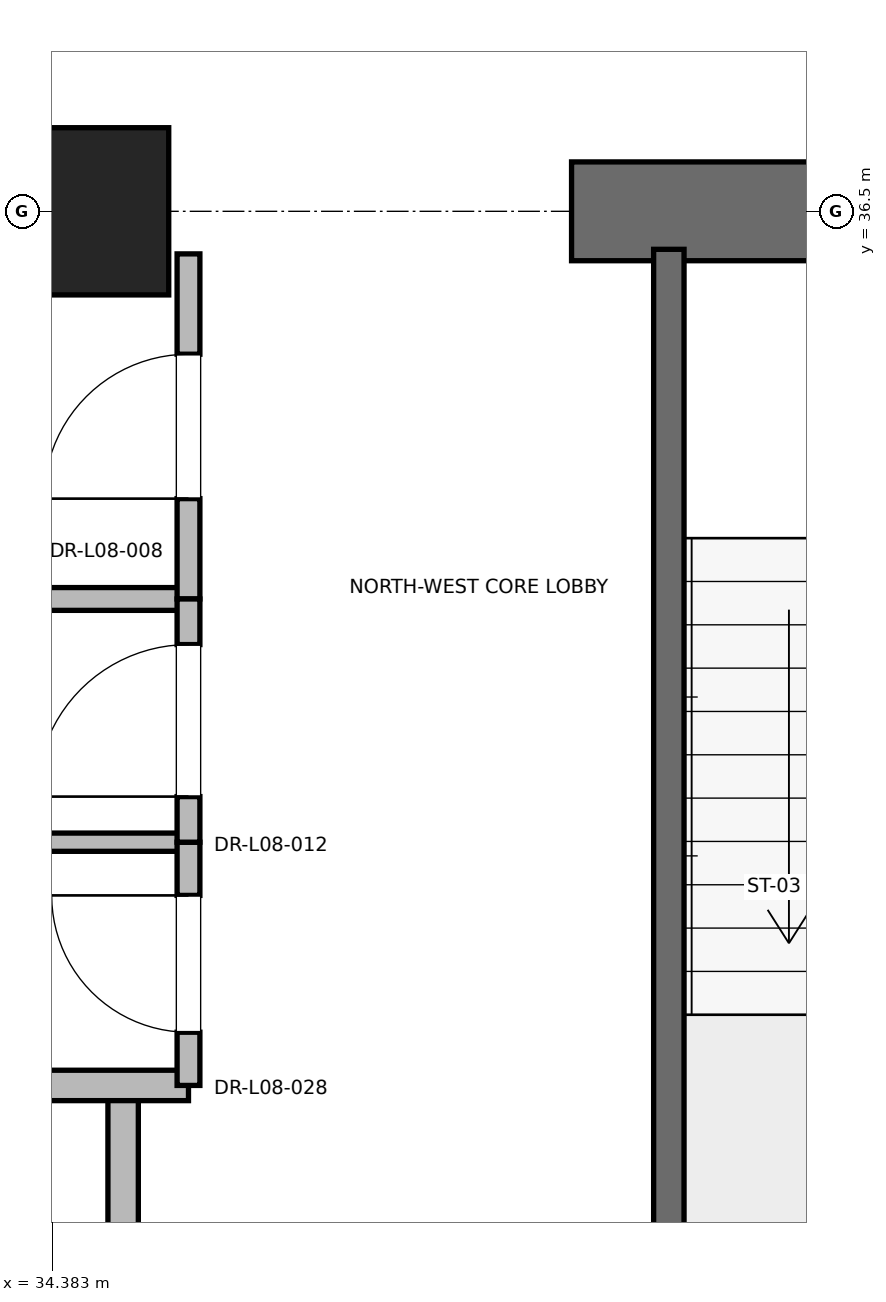
"""IFC4 building model, lengths in metres.
Left out: names, types, materials, properties, quantities, classifications, styles, units other than length and angle.
Written with IfcOpenShell. Run it as: python <this file> out.ifc"""

import sys

from ifc_helpers import new_model, si_unit, direction, frame, frame_2d, origin, origin_2d, place, context, subcontext, project, spatial, rectangle, extrude, element, fill, save


model = new_model("IFC4")
c1 = context("Model", 3, precision=1e-05, world=origin(), true_north=direction((0.0, 1.0)))
c2 = subcontext(c1, "Body", "Model", "MODEL_VIEW")
j1 = project(units=[si_unit("LENGTHUNIT", "METRE"), si_unit("PLANEANGLEUNIT", "RADIAN")], contexts=[c1])
p1 = place(None, origin())
s1 = spatial("IfcSite", under=j1, at=p1, CompositionType="ELEMENT")
p2 = place(p1, origin())
s2 = spatial("IfcBuilding", under=s1, at=p2, CompositionType="ELEMENT")
p3 = place(p2, frame((0.0, 0.0, 39.6)))
s3 = spatial("IfcBuildingStorey", under=s2, at=p3, CompositionType="ELEMENT", Elevation=39.6)
p4 = place(p3, frame((34.6, 36.5, 0.0), z_axis=(0.0, 0.0, 1.0), x_axis=(1.0, 0.0, 0.0)))
e1 = element("IfcColumn", 1, at=p4, inside=s3, PredefinedType="PILASTER", context=c2, shape_type="SweptSolid", body=[
    extrude(rectangle(XDim=1.1, YDim=1.1, at=origin_2d()), origin(), (0.0, 0.0, 1.0), 4.0),
])
p5 = place(p3, frame((29.0, 36.5, 0.0), z_axis=(0.0, 0.0, 1.0), x_axis=(1.0, 0.0, 0.0)))
e2 = element("IfcWall", 2, at=p5, inside=s3, PredefinedType="SHEAR", context=c2, shape_type="SweptSolid", body=[
    extrude(rectangle(XDim=5.8, YDim=0.65, at=frame_2d((2.9, 0.0))), origin(), (0.0, 0.0, 1.0), 3.76),
])
p6 = place(p3, frame((37.8, 36.5, 0.0), z_axis=(0.0, 0.0, 1.0), x_axis=(1.0, 0.0, 0.0)))
e3 = element("IfcWall", 3, at=p6, inside=s3, PredefinedType="SHEAR", context=c2, shape_type="SweptSolid", body=[
    extrude(rectangle(XDim=4.4, YDim=0.65, at=frame_2d((2.2, 0.0))), origin(), (0.0, 0.0, 1.0), 3.76),
])
p7 = place(p6, frame((1.65, 0.0, 0.0)))
e4 = element("IfcOpeningElement", 4, at=p7, cuts=e3, PredefinedType="OPENING", context=c2, shape_type="SweptSolid", body=[
    extrude(rectangle(XDim=1.1, YDim=2.15, at=frame_2d((0.55, 1.075))), frame((0.0, 0.325, 0.0), z_axis=(0.0, -1.0, 0.0), x_axis=(1.0, 0.0, 0.0)), (0.0, 0.0, 1.0), 0.65),
])
p8 = place(p3, frame((38.44, 27.38, 0.0), z_axis=(0.0, 0.0, 1.0), x_axis=(0.0, 1.0, 0.0)))
e5 = element("IfcWall", 5, at=p8, inside=s3, PredefinedType="SOLIDWALL", context=c2, shape_type="SweptSolid", body=[
    extrude(rectangle(XDim=8.87, YDim=0.2, at=frame_2d((4.435, 0.0))), origin(), (0.0, 0.0, 1.0), 3.76),
])
p9 = place(p3, frame((34.85, 27.38, 0.0), z_axis=(0.0, 0.0, 1.0), x_axis=(0.0, 1.0, 0.0)))
e6 = element("IfcWall", 6, at=p9, inside=s3, PredefinedType="PARTITIONING", context=c2, shape_type="SweptSolid", body=[
    extrude(rectangle(XDim=3.37, YDim=0.2, at=frame_2d((1.685, 0.0))), origin(), (0.0, 0.0, 1.0), 3.76),
])
p10 = place(p9, frame((1.11, 0.0, 0.0)))
e7 = element("IfcOpeningElement", 7, at=p10, cuts=e6, PredefinedType="OPENING", context=c2, shape_type="SweptSolid", body=[
    extrude(rectangle(XDim=1.15, YDim=2.2, at=frame_2d((0.575, 1.1))), frame((0.0, 0.1, 0.0), z_axis=(0.0, -1.0, 0.0), x_axis=(1.0, 0.0, 0.0)), (0.0, 0.0, 1.0), 0.2),
])
p11 = place(p3, frame((32.15, 30.75, 0.0), z_axis=(0.0, 0.0, 1.0), x_axis=(1.0, 0.0, 0.0)))
e8 = element("IfcWall", 8, at=p11, inside=s3, PredefinedType="PARTITIONING", context=c2, shape_type="SweptSolid", body=[
    extrude(rectangle(XDim=3.13, YDim=0.2, at=frame_2d((1.565, 0.0))), origin(), (0.0, 0.0, 1.0), 3.76),
])
p12 = place(p3, frame((32.15, 33.95, 0.0), z_axis=(0.0, 0.0, 1.0), x_axis=(1.0, 0.0, 0.0)))
e9 = element("IfcWall", 9, at=p12, inside=s3, PredefinedType="PARTITIONING", context=c2, shape_type="SweptSolid", body=[
    extrude(rectangle(XDim=3.13, YDim=0.15, at=frame_2d((1.565, 0.0))), origin(), (0.0, 0.0, 1.0), 2.85),
])
p13 = place(p3, frame((35.28, 33.95, 0.0), z_axis=(0.0, 0.0, 1.0), x_axis=(0.0, 1.0, 0.0)))
e10 = element("IfcWall", 10, at=p13, inside=s3, PredefinedType="PARTITIONING", context=c2, shape_type="SweptSolid", body=[
    extrude(rectangle(XDim=2.27, YDim=0.15, at=frame_2d((1.135, 0.0))), origin(), (0.0, 0.0, 1.0), 2.54),
])
p14 = place(p13, frame((0.66, 0.0, 0.0)))
e11 = element("IfcOpeningElement", 11, at=p14, cuts=e10, PredefinedType="OPENING", context=c2, shape_type="SweptSolid", body=[
    extrude(rectangle(XDim=0.95, YDim=2.15, at=frame_2d((0.475, 1.075))), frame((0.0, 0.075, 0.0), z_axis=(0.0, -1.0, 0.0), x_axis=(1.0, 0.0, 0.0)), (0.0, 0.0, 1.0), 0.15),
])
p15 = place(p3, frame((32.15, 32.35, 0.0), z_axis=(0.0, 0.0, 1.0), x_axis=(1.0, 0.0, 0.0)))
e12 = element("IfcWall", 12, at=p15, inside=s3, PredefinedType="PARTITIONING", context=c2, shape_type="SweptSolid", body=[
    extrude(rectangle(XDim=3.13, YDim=0.12, at=frame_2d((1.565, 0.0))), origin(), (0.0, 0.0, 1.0), 2.85),
])
p16 = place(p3, frame((35.28, 30.75, 0.0), z_axis=(0.0, 0.0, 1.0), x_axis=(0.0, 1.0, 0.0)))
e13 = element("IfcWall", 13, at=p16, inside=s3, PredefinedType="PARTITIONING", context=c2, shape_type="SweptSolid", body=[
    extrude(rectangle(XDim=1.6, YDim=0.15, at=frame_2d((0.8, 0.0))), origin(), (0.0, 0.0, 1.0), 2.85),
])
p17 = place(p16, frame((0.35, 0.0, 0.0)))
e14 = element("IfcOpeningElement", 14, at=p17, cuts=e13, PredefinedType="OPENING", context=c2, shape_type="SweptSolid", body=[
    extrude(rectangle(XDim=0.9, YDim=2.1, at=frame_2d((0.45, 1.05))), frame((0.0, 0.075, 0.0), z_axis=(0.0, -1.0, 0.0), x_axis=(1.0, 0.0, 0.0)), (0.0, 0.0, 1.0), 0.15),
])
p18 = place(p3, frame((35.28, 32.35, 0.0), z_axis=(0.0, 0.0, 1.0), x_axis=(0.0, 1.0, 0.0)))
e15 = element("IfcWall", 15, at=p18, inside=s3, PredefinedType="PARTITIONING", context=c2, shape_type="SweptSolid", body=[
    extrude(rectangle(XDim=1.6, YDim=0.15, at=frame_2d((0.8, 0.0))), origin(), (0.0, 0.0, 1.0), 2.85),
])
p19 = place(p18, frame((0.3, 0.0, 0.0)))
e16 = element("IfcOpeningElement", 16, at=p19, cuts=e15, PredefinedType="OPENING", context=c2, shape_type="SweptSolid", body=[
    extrude(rectangle(XDim=1.0, YDim=2.15, at=frame_2d((0.5, 1.075))), frame((0.0, 0.075, 0.0), z_axis=(0.0, -1.0, 0.0), x_axis=(1.0, 0.0, 0.0)), (0.0, 0.0, 1.0), 0.15),
])
p20 = place(p14, origin())
e17 = element("IfcDoor", 17, at=p20, inside=s3, OperationType="SINGLE_SWING_LEFT", PredefinedType="DOOR", context=c2, shape_type="SweptSolid", body=[
    extrude(rectangle(XDim=0.95, YDim=2.15, at=frame_2d((0.475, 1.075))), frame((0.0, 0.025, 0.0), z_axis=(0.0, -1.0, 0.0), x_axis=(1.0, 0.0, 0.0)), (0.0, 0.0, 1.0), 0.05),
])
fill(e11, e17)
p21 = place(p17, origin())
e18 = element("IfcDoor", 18, at=p21, inside=s3, OperationType="SINGLE_SWING_RIGHT", PredefinedType="DOOR", context=c2, shape_type="SweptSolid", body=[
    extrude(rectangle(XDim=0.9, YDim=2.1, at=frame_2d((0.45, 1.05))), frame((0.0, 0.025, 0.0), z_axis=(0.0, -1.0, 0.0), x_axis=(1.0, 0.0, 0.0)), (0.0, 0.0, 1.0), 0.05),
])
fill(e14, e18)
p22 = place(p19, origin())
e19 = element("IfcDoor", 19, at=p22, inside=s3, OperationType="SINGLE_SWING_LEFT", PredefinedType="DOOR", context=c2, shape_type="SweptSolid", body=[
    extrude(rectangle(XDim=1.0, YDim=2.15, at=frame_2d((0.5, 1.075))), frame((0.0, 0.025, 0.0), z_axis=(0.0, -1.0, 0.0), x_axis=(1.0, 0.0, 0.0)), (0.0, 0.0, 1.0), 0.05),
])
fill(e16, e19)
save(model, sys.argv[1])
